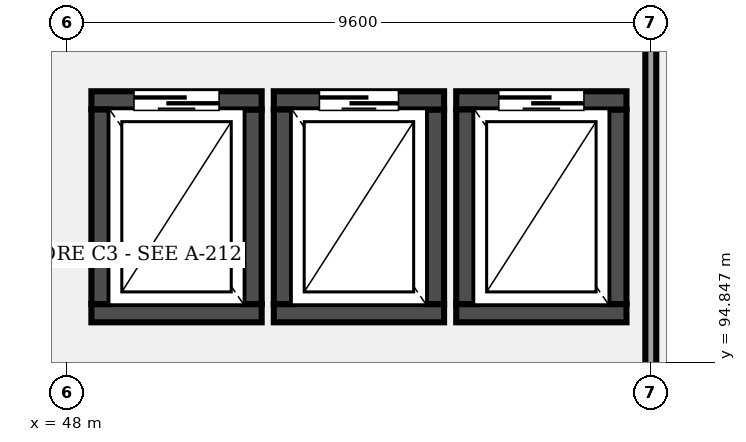
"""IFC4 building model, lengths in metres.
Left out: names, types, materials, properties, quantities, classifications, styles, units other than length and angle.
Written with IfcOpenShell. Run it as: python <this file> out.ifc"""

import sys

from ifc_helpers import new_model, si_unit, direction, frame, frame_2d, origin, place, context, subcontext, project, spatial, rectangle, extrude, element, fill, save


model = new_model("IFC4")
c1 = context("Model", 3, precision=1e-05, world=origin(), true_north=direction((0.0, 1.0)))
c2 = subcontext(c1, "Body", "Model", "MODEL_VIEW")
j1 = project(units=[si_unit("LENGTHUNIT", "METRE"), si_unit("PLANEANGLEUNIT", "RADIAN")], contexts=[c1])
p1 = place(None, origin())
s1 = spatial("IfcSite", under=j1, at=p1, CompositionType="ELEMENT")
p2 = place(p1, origin())
s2 = spatial("IfcBuilding", under=s1, at=p2, CompositionType="ELEMENT")
p3 = place(p2, frame((0.0, 0.0, 5.1)))
s3 = spatial("IfcBuildingStorey", under=s2, at=p3, CompositionType="ELEMENT", Elevation=5.1)
p4 = place(p3, frame((48.4, 95.65, 0.0), z_axis=(0.0, 0.0, 1.0), x_axis=(1.0, 0.0, 0.0)))
e1 = element("IfcWall", 1, at=p4, inside=s3, PredefinedType="SHEAR", context=c2, shape_type="SweptSolid", body=[
    extrude(rectangle(XDim=2.8, YDim=0.3, at=frame_2d((1.4, 0.0))), origin(), (0.0, 0.0, 1.0), 4.8),
])
p5 = place(p3, frame((51.05, 95.8, 0.0), z_axis=(0.0, 0.0, 1.0), x_axis=(0.0, 1.0, 0.0)))
e2 = element("IfcWall", 2, at=p5, inside=s3, PredefinedType="SHEAR", context=c2, shape_type="SweptSolid", body=[
    extrude(rectangle(XDim=3.2, YDim=0.3, at=frame_2d((1.6, 0.0))), origin(), (0.0, 0.0, 1.0), 4.8),
])
p6 = place(p3, frame((51.2, 99.15, 0.0), z_axis=(0.0, 0.0, 1.0), x_axis=(-1.0, 0.0, 0.0)))
e3 = element("IfcWall", 3, at=p6, inside=s3, PredefinedType="SHEAR", context=c2, shape_type="SweptSolid", body=[
    extrude(rectangle(XDim=2.8, YDim=0.3, at=frame_2d((1.4, 0.0))), origin(), (0.0, 0.0, 1.0), 4.8),
])
p7 = place(p6, frame((0.7, 0.0, 0.0)))
e4 = element("IfcOpeningElement", 4, at=p7, cuts=e3, PredefinedType="OPENING", context=c2, shape_type="SweptSolid", body=[
    extrude(rectangle(XDim=1.4, YDim=2.3, at=frame_2d((0.7, 1.15))), frame((0.0, 0.16, 0.0), z_axis=(0.0, -1.0, 0.0), x_axis=(1.0, 0.0, 0.0)), (0.0, 0.0, 1.0), 0.32),
])
p8 = place(p3, frame((48.55, 99.0, 0.0), z_axis=(0.0, 0.0, 1.0), x_axis=(0.0, -1.0, 0.0)))
e5 = element("IfcWall", 5, at=p8, inside=s3, PredefinedType="SHEAR", context=c2, shape_type="SweptSolid", body=[
    extrude(rectangle(XDim=3.2, YDim=0.3, at=frame_2d((1.6, 0.0))), origin(), (0.0, 0.0, 1.0), 4.8),
])
p9 = place(p3, frame((51.4, 95.65, 0.0), z_axis=(0.0, 0.0, 1.0), x_axis=(1.0, 0.0, 0.0)))
e6 = element("IfcWall", 6, at=p9, inside=s3, PredefinedType="SHEAR", context=c2, shape_type="SweptSolid", body=[
    extrude(rectangle(XDim=2.8, YDim=0.3, at=frame_2d((1.4, 0.0))), origin(), (0.0, 0.0, 1.0), 4.8),
])
p10 = place(p3, frame((54.05, 95.8, 0.0), z_axis=(0.0, 0.0, 1.0), x_axis=(0.0, 1.0, 0.0)))
e7 = element("IfcWall", 7, at=p10, inside=s3, PredefinedType="SHEAR", context=c2, shape_type="SweptSolid", body=[
    extrude(rectangle(XDim=3.2, YDim=0.3, at=frame_2d((1.6, 0.0))), origin(), (0.0, 0.0, 1.0), 4.8),
])
p11 = place(p3, frame((54.2, 99.15, 0.0), z_axis=(0.0, 0.0, 1.0), x_axis=(-1.0, 0.0, 0.0)))
e8 = element("IfcWall", 8, at=p11, inside=s3, PredefinedType="SHEAR", context=c2, shape_type="SweptSolid", body=[
    extrude(rectangle(XDim=2.8, YDim=0.3, at=frame_2d((1.4, 0.0))), origin(), (0.0, 0.0, 1.0), 4.8),
])
p12 = place(p11, frame((0.75, 0.0, 0.0)))
e9 = element("IfcOpeningElement", 9, at=p12, cuts=e8, PredefinedType="OPENING", context=c2, shape_type="SweptSolid", body=[
    extrude(rectangle(XDim=1.3, YDim=2.3, at=frame_2d((0.65, 1.15))), frame((0.0, 0.16, 0.0), z_axis=(0.0, -1.0, 0.0), x_axis=(1.0, 0.0, 0.0)), (0.0, 0.0, 1.0), 0.32),
])
p13 = place(p3, frame((51.55, 99.0, 0.0), z_axis=(0.0, 0.0, 1.0), x_axis=(0.0, -1.0, 0.0)))
e10 = element("IfcWall", 10, at=p13, inside=s3, PredefinedType="SHEAR", context=c2, shape_type="SweptSolid", body=[
    extrude(rectangle(XDim=3.2, YDim=0.3, at=frame_2d((1.6, 0.0))), origin(), (0.0, 0.0, 1.0), 4.8),
])
p14 = place(p3, frame((54.4, 95.65, 0.0), z_axis=(0.0, 0.0, 1.0), x_axis=(1.0, 0.0, 0.0)))
e11 = element("IfcWall", 11, at=p14, inside=s3, PredefinedType="SHEAR", context=c2, shape_type="SweptSolid", body=[
    extrude(rectangle(XDim=2.8, YDim=0.3, at=frame_2d((1.4, 0.0))), origin(), (0.0, 0.0, 1.0), 4.8),
])
p15 = place(p3, frame((57.05, 95.8, 0.0), z_axis=(0.0, 0.0, 1.0), x_axis=(0.0, 1.0, 0.0)))
e12 = element("IfcWall", 12, at=p15, inside=s3, PredefinedType="SHEAR", context=c2, shape_type="SweptSolid", body=[
    extrude(rectangle(XDim=3.2, YDim=0.3, at=frame_2d((1.6, 0.0))), origin(), (0.0, 0.0, 1.0), 4.8),
])
p16 = place(p3, frame((57.2, 99.15, 0.0), z_axis=(0.0, 0.0, 1.0), x_axis=(-1.0, 0.0, 0.0)))
e13 = element("IfcWall", 13, at=p16, inside=s3, PredefinedType="SHEAR", context=c2, shape_type="SweptSolid", body=[
    extrude(rectangle(XDim=2.8, YDim=0.3, at=frame_2d((1.4, 0.0))), origin(), (0.0, 0.0, 1.0), 4.8),
])
p17 = place(p16, frame((0.7, 0.0, 0.0)))
e14 = element("IfcOpeningElement", 14, at=p17, cuts=e13, PredefinedType="OPENING", context=c2, shape_type="SweptSolid", body=[
    extrude(rectangle(XDim=1.4, YDim=2.3, at=frame_2d((0.7, 1.15))), frame((0.0, 0.16, 0.0), z_axis=(0.0, -1.0, 0.0), x_axis=(1.0, 0.0, 0.0)), (0.0, 0.0, 1.0), 0.32),
])
p18 = place(p3, frame((54.55, 99.0, 0.0), z_axis=(0.0, 0.0, 1.0), x_axis=(0.0, -1.0, 0.0)))
e15 = element("IfcWall", 15, at=p18, inside=s3, PredefinedType="SHEAR", context=c2, shape_type="SweptSolid", body=[
    extrude(rectangle(XDim=3.2, YDim=0.3, at=frame_2d((1.6, 0.0))), origin(), (0.0, 0.0, 1.0), 4.8),
])
p19 = place(p3, frame((57.6, 84.55, 0.0), z_axis=(0.0, 0.0, 1.0), x_axis=(0.0, 1.0, 0.0)))
e16 = element("IfcWall", 16, at=p19, inside=s3, PredefinedType="PARTITIONING", context=c2, shape_type="SweptSolid", body=[
    extrude(rectangle(XDim=17.3, YDim=0.18, at=frame_2d((8.65, 0.0))), origin(), (0.0, 0.0, 1.0), 3.68),
])
p20 = place(p7, origin())
e17 = element("IfcDoor", 17, at=p20, inside=s3, OperationType="SLIDING_TO_LEFT", PredefinedType="DOOR", context=c2, shape_type="SweptSolid", body=[
    extrude(rectangle(XDim=1.4, YDim=2.3, at=frame_2d((0.7, 1.15))), frame((0.0, 0.025, 0.0), z_axis=(0.0, -1.0, 0.0), x_axis=(1.0, 0.0, 0.0)), (0.0, 0.0, 1.0), 0.05),
])
fill(e4, e17)
p21 = place(p12, origin())
e18 = element("IfcDoor", 18, at=p21, inside=s3, OperationType="SLIDING_TO_LEFT", PredefinedType="DOOR", context=c2, shape_type="SweptSolid", body=[
    extrude(rectangle(XDim=1.3, YDim=2.3, at=frame_2d((0.65, 1.15))), frame((0.0, 0.025, 0.0), z_axis=(0.0, -1.0, 0.0), x_axis=(1.0, 0.0, 0.0)), (0.0, 0.0, 1.0), 0.05),
])
fill(e9, e18)
p22 = place(p17, origin())
e19 = element("IfcDoor", 19, at=p22, inside=s3, OperationType="SLIDING_TO_LEFT", PredefinedType="DOOR", context=c2, shape_type="SweptSolid", body=[
    extrude(rectangle(XDim=1.4, YDim=2.3, at=frame_2d((0.7, 1.15))), frame((0.0, 0.025, 0.0), z_axis=(0.0, -1.0, 0.0), x_axis=(1.0, 0.0, 0.0)), (0.0, 0.0, 1.0), 0.05),
])
fill(e14, e19)
save(model, sys.argv[1])
